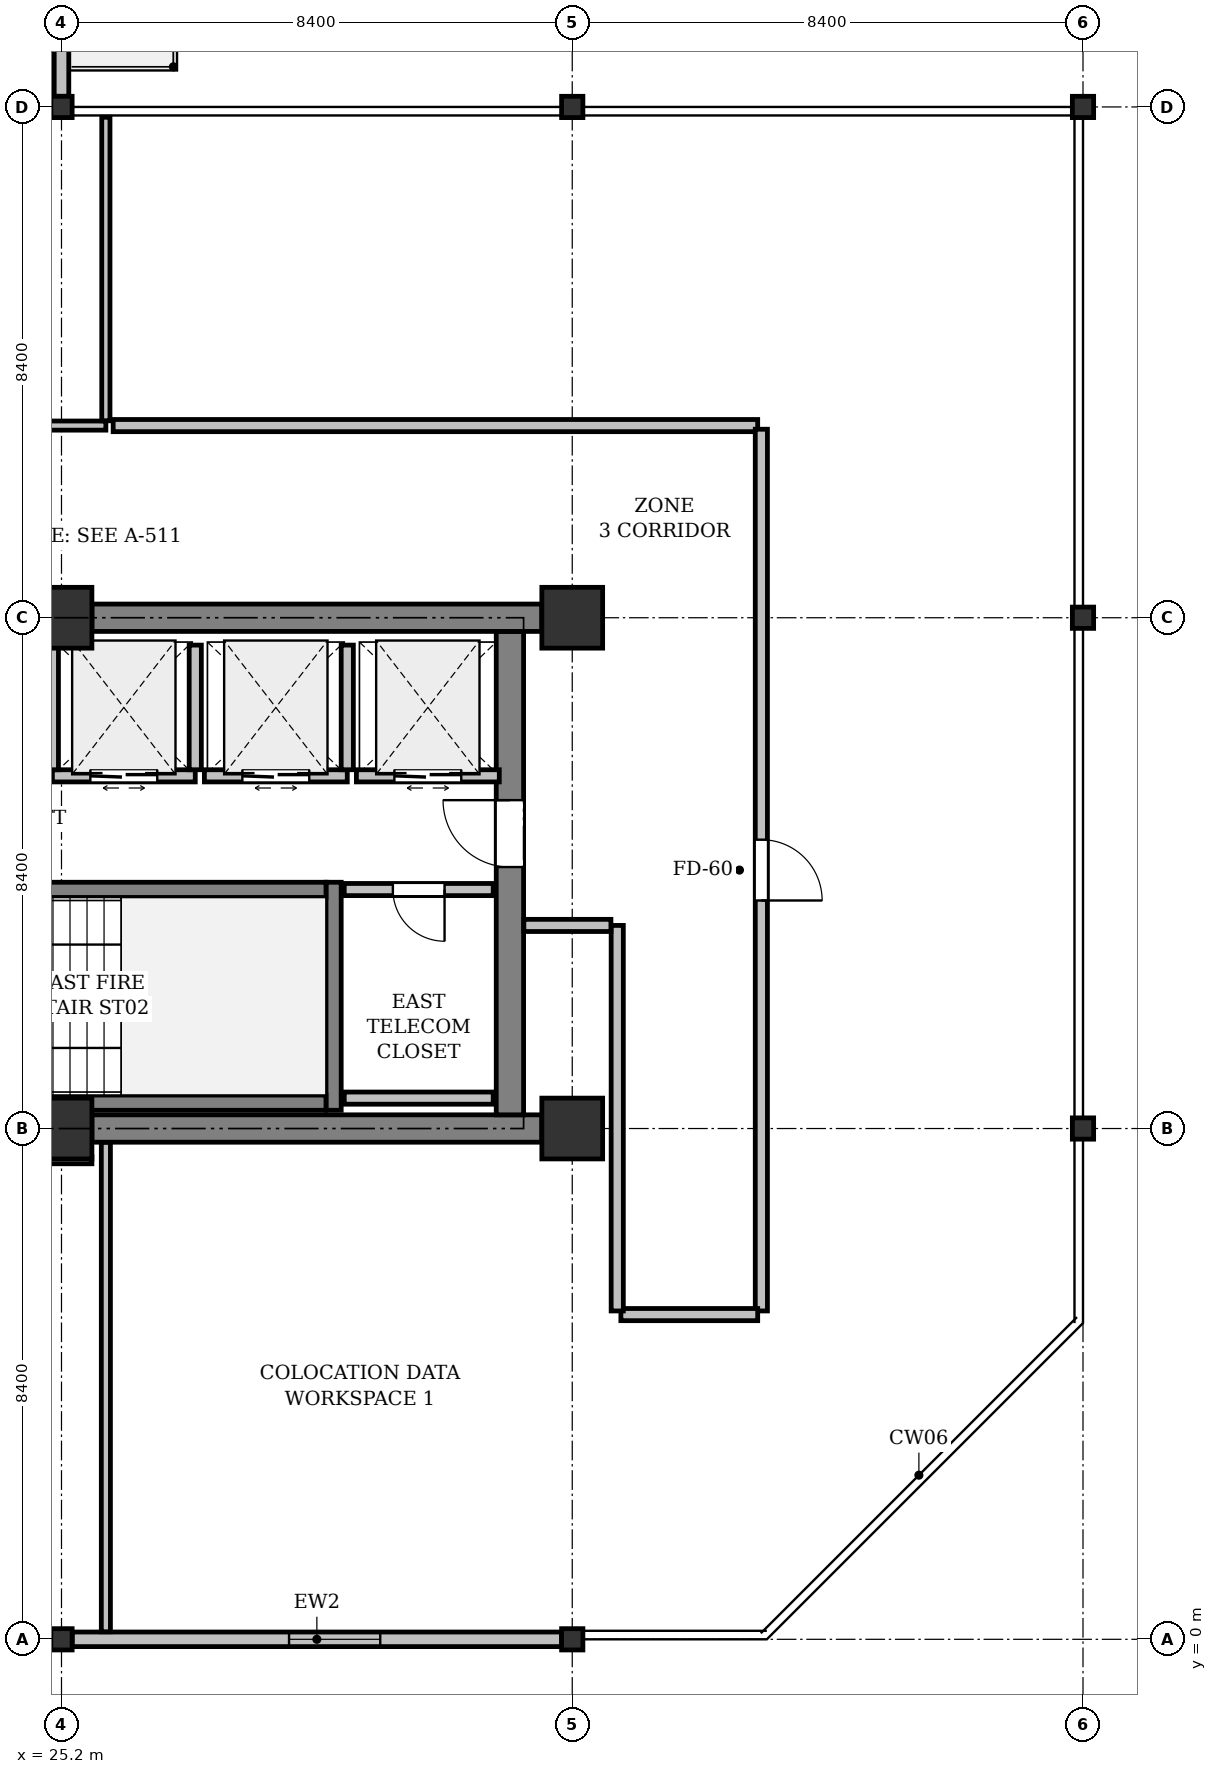
"""IFC4 building model, lengths in metres.
Left out: names, types, materials, properties, quantities, classifications, styles, units other than length and angle.
Written with IfcOpenShell. Run it as: python <this file> out.ifc"""

import sys

from ifc_helpers import new_model, si_unit, direction, frame, frame_2d, origin, origin_2d, place, context, subcontext, project, spatial, rectangle, i_section, extrude, element, fill, save


model = new_model("IFC4")
c1 = context("Model", 3, precision=1e-05, world=origin(), true_north=direction((0.0, 1.0)))
c2 = subcontext(c1, "Body", "Model", "MODEL_VIEW")
j1 = project(units=[si_unit("LENGTHUNIT", "METRE"), si_unit("PLANEANGLEUNIT", "RADIAN")], contexts=[c1])
p1 = place(None, origin())
s1 = spatial("IfcSite", under=j1, at=p1, CompositionType="ELEMENT")
p2 = place(p1, origin())
s2 = spatial("IfcBuilding", under=s1, at=p2, CompositionType="ELEMENT")
p3 = place(p2, frame((0.0, 0.0, 237.0)))
s3 = spatial("IfcBuildingStorey", under=s2, at=p3, CompositionType="ELEMENT", Elevation=237.0)
p4 = place(p3, frame((25.2, 0.0, 0.0), z_axis=(0.0, 0.0, 1.0), x_axis=(1.0, 0.0, 0.0)))
e1 = element("IfcColumn", 1, at=p4, inside=s3, PredefinedType="COLUMN", context=c2, shape_type="SweptSolid", body=[
    extrude(i_section(OverallWidth=0.35, OverallDepth=0.35, WebThickness=0.02, FlangeThickness=0.032, at=origin_2d()), origin(), (0.0, 0.0, 1.0), 4.1),
])
for number, where, z_axis, x_axis in (
    (2, (25.2, 8.4, 0.0), (0.0, 0.0, 1.0), (1.0, 0.0, 0.0)),
    (3, (25.2, 16.8, 0.0), (0.0, 0.0, 1.0), (1.0, 0.0, 0.0)),
):
    element("IfcColumn", number, at=place(p3, frame(where, z_axis=z_axis, x_axis=x_axis)), inside=s3, PredefinedType="COLUMN", context=c2, shape_type="SweptSolid", body=[
        extrude(rectangle(XDim=1.0, YDim=1.0, at=origin_2d()), origin(), (0.0, 0.0, 1.0), 4.1),
    ])
for number, where, z_axis, x_axis in (
    (4, (25.2, 25.2, 0.0), (0.0, 0.0, 1.0), (1.0, 0.0, 0.0)),
    (5, (33.6, 0.0, 0.0), (0.0, 0.0, 1.0), (1.0, 0.0, 0.0)),
):
    element("IfcColumn", number, at=place(p3, frame(where, z_axis=z_axis, x_axis=x_axis)), inside=s3, PredefinedType="COLUMN", context=c2, shape_type="SweptSolid", body=[
        extrude(i_section(OverallWidth=0.35, OverallDepth=0.35, WebThickness=0.02, FlangeThickness=0.032, at=origin_2d()), origin(), (0.0, 0.0, 1.0), 4.1),
    ])
for number, where, z_axis, x_axis in (
    (6, (33.6, 8.4, 0.0), (0.0, 0.0, 1.0), (1.0, 0.0, 0.0)),
    (7, (33.6, 16.8, 0.0), (0.0, 0.0, 1.0), (1.0, 0.0, 0.0)),
):
    element("IfcColumn", number, at=place(p3, frame(where, z_axis=z_axis, x_axis=x_axis)), inside=s3, PredefinedType="COLUMN", context=c2, shape_type="SweptSolid", body=[
        extrude(rectangle(XDim=1.0, YDim=1.0, at=origin_2d()), origin(), (0.0, 0.0, 1.0), 4.1),
    ])
for number, where, z_axis, x_axis in (
    (8, (33.6, 25.2, 0.0), (0.0, 0.0, 1.0), (1.0, 0.0, 0.0)),
    (9, (42.0, 8.4, 0.0), (0.0, 0.0, 1.0), (1.0, 0.0, 0.0)),
    (10, (42.0, 16.8, 0.0), (0.0, 0.0, 1.0), (1.0, 0.0, 0.0)),
    (11, (42.0, 25.2, 0.0), (0.0, 0.0, 1.0), (1.0, 0.0, 0.0)),
):
    element("IfcColumn", number, at=place(p3, frame(where, z_axis=z_axis, x_axis=x_axis)), inside=s3, PredefinedType="COLUMN", context=c2, shape_type="SweptSolid", body=[
        extrude(i_section(OverallWidth=0.35, OverallDepth=0.35, WebThickness=0.02, FlangeThickness=0.032, at=origin_2d()), origin(), (0.0, 0.0, 1.0), 4.1),
    ])
p5 = place(p3, frame((33.425, 0.0, 0.0), z_axis=(0.0, 0.0, 1.0), x_axis=(-1.0, 0.0, 0.0)))
e12 = element("IfcWall", 12, at=p5, inside=s3, PredefinedType="STANDARD", context=c2, shape_type="SweptSolid", body=[
    extrude(rectangle(XDim=8.05, YDim=0.24, at=frame_2d((4.025, 0.0))), origin(), (0.0, 0.0, 1.0), 3.525),
])
p6 = place(p5, frame((2.983, 0.0, 0.9)))
e13 = element("IfcOpeningElement", 13, at=p6, cuts=e12, PredefinedType="OPENING", context=c2, shape_type="SweptSolid", body=[
    extrude(rectangle(XDim=1.5, YDim=1.6, at=frame_2d((0.75, 0.8))), frame((0.0, 0.13, 0.0), z_axis=(0.0, -1.0, 0.0), x_axis=(1.0, 0.0, 0.0)), (0.0, 0.0, 1.0), 0.26),
])
p7 = place(p3, frame((25.2, 33.425, 0.0), z_axis=(0.0, 0.0, 1.0), x_axis=(0.0, -1.0, 0.0)))
e14 = element("IfcWall", 14, at=p7, inside=s3, PredefinedType="STANDARD", context=c2, shape_type="SweptSolid", body=[
    extrude(rectangle(XDim=8.05, YDim=0.24, at=frame_2d((4.025, 0.0))), origin(), (0.0, 0.0, 1.0), 3.525),
])
p8 = place(p7, frame((0.3, 0.0, 0.0)))
e15 = element("IfcOpeningElement", 15, at=p8, cuts=e14, PredefinedType="OPENING", context=c2, shape_type="SweptSolid", body=[
    extrude(rectangle(XDim=1.2, YDim=2.2, at=frame_2d((0.6, 1.1))), frame((0.0, 0.13, 0.0), z_axis=(0.0, -1.0, 0.0), x_axis=(1.0, 0.0, 0.0)), (0.0, 0.0, 1.0), 0.26),
])
p9 = place(p7, frame((2.154, 0.0, 0.9)))
e16 = element("IfcOpeningElement", 16, at=p9, cuts=e14, PredefinedType="OPENING", context=c2, shape_type="SweptSolid", body=[
    extrude(rectangle(XDim=1.5, YDim=1.6, at=frame_2d((0.75, 0.8))), frame((0.0, 0.13, 0.0), z_axis=(0.0, -1.0, 0.0), x_axis=(1.0, 0.0, 0.0)), (0.0, 0.0, 1.0), 0.26),
])
p10 = place(p3, frame((25.7, 8.4, 0.0), z_axis=(0.0, 0.0, 1.0), x_axis=(1.0, 0.0, 0.0)))
e17 = element("IfcWall", 17, at=p10, inside=s3, PredefinedType="SHEAR", context=c2, shape_type="SweptSolid", body=[
    extrude(rectangle(XDim=7.4, YDim=0.45, at=frame_2d((3.7, 0.0))), origin(), (0.0, 0.0, 1.0), 3.825),
])
p11 = place(p3, frame((32.575, 8.625, 0.0), z_axis=(0.0, 0.0, 1.0), x_axis=(0.0, 1.0, 0.0)))
e18 = element("IfcWall", 18, at=p11, inside=s3, PredefinedType="SHEAR", context=c2, shape_type="SweptSolid", body=[
    extrude(rectangle(XDim=7.95, YDim=0.45, at=frame_2d((3.975, 0.0))), origin(), (0.0, 0.0, 1.0), 3.825),
])
p12 = place(p11, frame((4.075, 0.0, 0.0)))
e19 = element("IfcOpeningElement", 19, at=p12, cuts=e18, PredefinedType="OPENING", context=c2, shape_type="SweptSolid", body=[
    extrude(rectangle(XDim=1.1, YDim=2.15, at=frame_2d((0.55, 1.075))), frame((0.0, 0.235, 0.0), z_axis=(0.0, -1.0, 0.0), x_axis=(1.0, 0.0, 0.0)), (0.0, 0.0, 1.0), 0.47),
])
p13 = place(p3, frame((25.7, 16.8, 0.0), z_axis=(0.0, 0.0, 1.0), x_axis=(1.0, 0.0, 0.0)))
e20 = element("IfcWall", 20, at=p13, inside=s3, PredefinedType="SHEAR", context=c2, shape_type="SweptSolid", body=[
    extrude(rectangle(XDim=7.4, YDim=0.45, at=frame_2d((3.7, 0.0))), origin(), (0.0, 0.0, 1.0), 3.825),
])
p14 = place(p3, frame((29.675, 8.7, 0.0), z_axis=(0.0, 0.0, 1.0), x_axis=(0.0, 1.0, 0.0)))
e21 = element("IfcWall", 21, at=p14, inside=s3, PredefinedType="SHEAR", context=c2, shape_type="SweptSolid", body=[
    extrude(rectangle(XDim=3.75, YDim=0.25, at=frame_2d((1.875, 0.0))), origin(), (0.0, 0.0, 1.0), 3.825),
])
p15 = place(p3, frame((21.8, 8.825, 0.0), z_axis=(0.0, 0.0, 1.0), x_axis=(1.0, 0.0, 0.0)))
e22 = element("IfcWall", 22, at=p15, inside=s3, PredefinedType="SHEAR", context=c2, shape_type="SweptSolid", body=[
    extrude(rectangle(XDim=7.75, YDim=0.25, at=frame_2d((3.875, 0.0))), origin(), (0.0, 0.0, 1.0), 3.825),
])
p16 = place(p3, frame((21.8, 12.325, 0.0), z_axis=(0.0, 0.0, 1.0), x_axis=(1.0, 0.0, 0.0)))
e23 = element("IfcWall", 23, at=p16, inside=s3, PredefinedType="SHEAR", context=c2, shape_type="SweptSolid", body=[
    extrude(rectangle(XDim=7.75, YDim=0.25, at=frame_2d((3.875, 0.0))), origin(), (0.0, 0.0, 1.0), 3.825),
])
p17 = place(p16, frame((0.22, 0.0, 0.0)))
e24 = element("IfcOpeningElement", 24, at=p17, cuts=e23, PredefinedType="OPENING", context=c2, shape_type="SweptSolid", body=[
    extrude(rectangle(XDim=1.1, YDim=2.15, at=frame_2d((0.55, 1.075))), frame((0.0, 0.135, 0.0), z_axis=(0.0, -1.0, 0.0), x_axis=(1.0, 0.0, 0.0)), (0.0, 0.0, 1.0), 0.27),
])
p18 = place(p3, frame((25.05, 14.2, 0.0), z_axis=(0.0, 0.0, 1.0), x_axis=(1.0, 0.0, 0.0)))
e25 = element("IfcWall", 25, at=p18, inside=s3, PredefinedType="PARTITIONING", context=c2, shape_type="SweptSolid", body=[
    extrude(rectangle(XDim=2.35, YDim=0.2, at=frame_2d((1.175, 0.0))), origin(), (0.0, 0.0, 1.0), 3.825),
])
p19 = place(p18, frame((0.625, 0.0, 0.0)))
e26 = element("IfcOpeningElement", 26, at=p19, cuts=e25, PredefinedType="OPENING", context=c2, shape_type="SweptSolid", body=[
    extrude(rectangle(XDim=1.1, YDim=2.2, at=frame_2d((0.55, 1.1))), frame((0.0, 0.11, 0.0), z_axis=(0.0, -1.0, 0.0), x_axis=(1.0, 0.0, 0.0)), (0.0, 0.0, 1.0), 0.22),
])
for number, where, z_axis, x_axis in (
    (27, (27.4, 14.3, 0.0), (0.0, 0.0, 1.0), (0.0, 1.0, 0.0)),
    (28, (25.05, 14.3, 0.0), (0.0, 0.0, 1.0), (0.0, 1.0, 0.0)),
):
    element("IfcWall", number, at=place(p3, frame(where, z_axis=z_axis, x_axis=x_axis)), inside=s3, PredefinedType="PARTITIONING", context=c2, shape_type="SweptSolid", body=[
        extrude(rectangle(XDim=2.05, YDim=0.2, at=frame_2d((1.025, 0.0))), origin(), (0.0, 0.0, 1.0), 3.825),
    ])
p20 = place(p3, frame((27.55, 14.2, 0.0), z_axis=(0.0, 0.0, 1.0), x_axis=(1.0, 0.0, 0.0)))
e29 = element("IfcWall", 29, at=p20, inside=s3, PredefinedType="PARTITIONING", context=c2, shape_type="SweptSolid", body=[
    extrude(rectangle(XDim=2.35, YDim=0.2, at=frame_2d((1.175, 0.0))), origin(), (0.0, 0.0, 1.0), 3.825),
])
p21 = place(p20, frame((0.625, 0.0, 0.0)))
e30 = element("IfcOpeningElement", 30, at=p21, cuts=e29, PredefinedType="OPENING", context=c2, shape_type="SweptSolid", body=[
    extrude(rectangle(XDim=1.1, YDim=2.2, at=frame_2d((0.55, 1.1))), frame((0.0, 0.11, 0.0), z_axis=(0.0, -1.0, 0.0), x_axis=(1.0, 0.0, 0.0)), (0.0, 0.0, 1.0), 0.22),
])
p22 = place(p3, frame((29.9, 14.3, 0.0), z_axis=(0.0, 0.0, 1.0), x_axis=(0.0, 1.0, 0.0)))
e31 = element("IfcWall", 31, at=p22, inside=s3, PredefinedType="PARTITIONING", context=c2, shape_type="SweptSolid", body=[
    extrude(rectangle(XDim=2.05, YDim=0.2, at=frame_2d((1.025, 0.0))), origin(), (0.0, 0.0, 1.0), 3.825),
])
p23 = place(p3, frame((30.05, 14.2, 0.0), z_axis=(0.0, 0.0, 1.0), x_axis=(1.0, 0.0, 0.0)))
e32 = element("IfcWall", 32, at=p23, inside=s3, PredefinedType="PARTITIONING", context=c2, shape_type="SweptSolid", body=[
    extrude(rectangle(XDim=2.35, YDim=0.2, at=frame_2d((1.175, 0.0))), origin(), (0.0, 0.0, 1.0), 3.825),
])
p24 = place(p23, frame((0.625, 0.0, 0.0)))
e33 = element("IfcOpeningElement", 33, at=p24, cuts=e32, PredefinedType="OPENING", context=c2, shape_type="SweptSolid", body=[
    extrude(rectangle(XDim=1.1, YDim=2.2, at=frame_2d((0.55, 1.1))), frame((0.0, 0.11, 0.0), z_axis=(0.0, -1.0, 0.0), x_axis=(1.0, 0.0, 0.0)), (0.0, 0.0, 1.0), 0.22),
])
p25 = place(p3, frame((32.3, 12.33, 0.0), z_axis=(0.0, 0.0, 1.0), x_axis=(-1.0, 0.0, 0.0)))
e34 = element("IfcWall", 34, at=p25, inside=s3, PredefinedType="PARTITIONING", context=c2, shape_type="SweptSolid", body=[
    extrude(rectangle(XDim=2.45, YDim=0.2, at=frame_2d((1.225, 0.0))), origin(), (0.0, 0.0, 1.0), 3.825),
])
p26 = place(p25, frame((0.8, 0.0, 0.0)))
e35 = element("IfcOpeningElement", 35, at=p26, cuts=e34, PredefinedType="OPENING", context=c2, shape_type="SweptSolid", body=[
    extrude(rectangle(XDim=0.85, YDim=2.15, at=frame_2d((0.425, 1.075))), frame((0.0, 0.11, 0.0), z_axis=(0.0, -1.0, 0.0), x_axis=(1.0, 0.0, 0.0)), (0.0, 0.0, 1.0), 0.22),
])
p27 = place(p3, frame((29.85, 8.9, 0.0), z_axis=(0.0, 0.0, 1.0), x_axis=(1.0, 0.0, 0.0)))
e36 = element("IfcWall", 36, at=p27, inside=s3, PredefinedType="PARTITIONING", context=c2, shape_type="SweptSolid", body=[
    extrude(rectangle(XDim=2.45, YDim=0.2, at=frame_2d((1.225, 0.0))), origin(), (0.0, 0.0, 1.0), 3.825),
])
p28 = place(p3, frame((7.774, 19.96, 0.0), z_axis=(0.0, 0.0, 1.0), x_axis=(1.0, 0.0, 0.0)))
e37 = element("IfcWall", 37, at=p28, inside=s3, PredefinedType="PARTITIONING", context=c2, shape_type="SweptSolid", body=[
    extrude(rectangle(XDim=18.156, YDim=0.15, at=frame_2d((9.078, 0.0))), origin(), (0.0, 0.0, 1.0), 3.371),
])
p29 = place(p28, frame((8.603, 0.0, 0.0)))
e38 = element("IfcOpeningElement", 38, at=p29, cuts=e37, PredefinedType="OPENING", context=c2, shape_type="SweptSolid", body=[
    extrude(rectangle(XDim=0.95, YDim=2.15, at=frame_2d((0.475, 1.075))), frame((0.0, 0.085, 0.0), z_axis=(0.0, -1.0, 0.0), x_axis=(1.0, 0.0, 0.0)), (0.0, 0.0, 1.0), 0.17),
])
p30 = place(p3, frame((25.93, 20.039, 0.0), z_axis=(0.0, 0.0, 1.0), x_axis=(0.0, 1.0, 0.0)))
e39 = element("IfcWall", 39, at=p30, inside=s3, PredefinedType="PARTITIONING", context=c2, shape_type="SweptSolid", body=[
    extrude(rectangle(XDim=4.992, YDim=0.135, at=frame_2d((2.496, 0.0))), origin(), (0.0, 0.0, 1.0), 3.825),
])
p31 = place(p3, frame((25.93, 0.124, 0.0), z_axis=(0.0, 0.0, 1.0), x_axis=(0.0, 1.0, 0.0)))
e40 = element("IfcWall", 40, at=p31, inside=s3, PredefinedType="PARTITIONING", context=c2, shape_type="SweptSolid", body=[
    extrude(rectangle(XDim=8.047, YDim=0.15, at=frame_2d((4.023, 0.0))), origin(), (0.0, 0.0, 1.0), 3.825),
])
p32 = place(p3, frame((25.7, 7.88, 0.0), z_axis=(0.0, 0.0, 1.0), x_axis=(-0.999999528702, 0.000970873329, 0.0)))
e41 = element("IfcWall", 41, at=p32, inside=s3, PredefinedType="PARTITIONING", context=c2, shape_type="SweptSolid", body=[
    extrude(rectangle(XDim=1.006, YDim=0.12, at=frame_2d((0.503, 0.0))), origin(), (0.0, 0.0, 1.0), 3.371),
])
p33 = place(p3, frame((26.05, 19.96, 0.0), z_axis=(0.0, 0.0, 1.0), x_axis=(1.0, 0.0, 0.0)))
e42 = element("IfcWall", 42, at=p33, inside=s3, PredefinedType="PARTITIONING", context=c2, shape_type="SweptSolid", body=[
    extrude(rectangle(XDim=10.6, YDim=0.2, at=frame_2d((5.3, 0.0))), origin(), (0.0, 0.0, 1.0), 3.371),
])
p34 = place(p3, frame((36.71, 19.9, 0.0), z_axis=(0.0, 0.0, 1.0), x_axis=(0.0, -1.0, 0.0)))
e43 = element("IfcWall", 43, at=p34, inside=s3, PredefinedType="PARTITIONING", context=c2, shape_type="SweptSolid", body=[
    extrude(rectangle(XDim=14.5, YDim=0.2, at=frame_2d((7.25, 0.0))), origin(), (0.0, 0.0, 1.0), 3.365),
])
p35 = place(p34, frame((6.75, 0.0, 0.0)))
e44 = element("IfcOpeningElement", 44, at=p35, cuts=e43, PredefinedType="OPENING", context=c2, shape_type="SweptSolid", body=[
    extrude(rectangle(XDim=1.0, YDim=2.15, at=frame_2d((0.5, 1.075))), frame((0.0, 0.11, 0.0), z_axis=(0.0, -1.0, 0.0), x_axis=(1.0, 0.0, 0.0)), (0.0, 0.0, 1.0), 0.22),
])
p36 = place(p3, frame((36.65, 5.34, 0.0), z_axis=(0.0, 0.0, 1.0), x_axis=(-1.0, 0.0, 0.0)))
e45 = element("IfcWall", 45, at=p36, inside=s3, PredefinedType="PARTITIONING", context=c2, shape_type="SweptSolid", body=[
    extrude(rectangle(XDim=2.25, YDim=0.2, at=frame_2d((1.125, 0.0))), origin(), (0.0, 0.0, 1.0), 3.825),
])
p37 = place(p3, frame((34.34, 5.4, 0.0), z_axis=(0.0, 0.0, 1.0), x_axis=(0.0, 1.0, 0.0)))
e46 = element("IfcWall", 46, at=p37, inside=s3, PredefinedType="PARTITIONING", context=c2, shape_type="SweptSolid", body=[
    extrude(rectangle(XDim=6.34, YDim=0.2, at=frame_2d((3.17, 0.0))), origin(), (0.0, 0.0, 1.0), 3.365),
])
p38 = place(p3, frame((34.236, 11.74, 0.0), z_axis=(0.0, 0.0, 1.0), x_axis=(-1.0, 0.0, 0.0)))
e47 = element("IfcWall", 47, at=p38, inside=s3, PredefinedType="PARTITIONING", context=c2, shape_type="SweptSolid", body=[
    extrude(rectangle(XDim=1.432, YDim=0.2, at=frame_2d((0.716, 0.0))), origin(), (0.0, 0.0, 1.0), 3.371),
])
p39 = place(p6, origin())
e48 = element("IfcWindow", 48, at=p39, inside=s3, PartitioningType="SINGLE_PANEL", PredefinedType="WINDOW", context=c2, shape_type="SweptSolid", body=[
    extrude(rectangle(XDim=1.5, YDim=1.6, at=frame_2d((0.75, 0.8))), frame((0.0, 0.03, 0.0), z_axis=(0.0, -1.0, 0.0), x_axis=(1.0, 0.0, 0.0)), (0.0, 0.0, 1.0), 0.06),
])
fill(e13, e48)
p40 = place(p12, origin())
e49 = element("IfcDoor", 49, at=p40, inside=s3, OperationType="SINGLE_SWING_RIGHT", PredefinedType="DOOR", context=c2, shape_type="SweptSolid", body=[
    extrude(rectangle(XDim=1.1, YDim=2.15, at=frame_2d((0.55, 1.075))), frame((0.0, 0.025, 0.0), z_axis=(0.0, -1.0, 0.0), x_axis=(1.0, 0.0, 0.0)), (0.0, 0.0, 1.0), 0.05),
])
fill(e19, e49)
p41 = place(p19, origin())
e50 = element("IfcDoor", 50, at=p41, inside=s3, OperationType="DOUBLE_DOOR_SLIDING", PredefinedType="DOOR", context=c2, shape_type="SweptSolid", body=[
    extrude(rectangle(XDim=1.1, YDim=2.2, at=frame_2d((0.55, 1.1))), frame((0.0, 0.025, 0.0), z_axis=(0.0, -1.0, 0.0), x_axis=(1.0, 0.0, 0.0)), (0.0, 0.0, 1.0), 0.05),
])
fill(e26, e50)
p42 = place(p21, origin())
e51 = element("IfcDoor", 51, at=p42, inside=s3, OperationType="DOUBLE_DOOR_SLIDING", PredefinedType="DOOR", context=c2, shape_type="SweptSolid", body=[
    extrude(rectangle(XDim=1.1, YDim=2.2, at=frame_2d((0.55, 1.1))), frame((0.0, 0.025, 0.0), z_axis=(0.0, -1.0, 0.0), x_axis=(1.0, 0.0, 0.0)), (0.0, 0.0, 1.0), 0.05),
])
fill(e30, e51)
p43 = place(p24, origin())
e52 = element("IfcDoor", 52, at=p43, inside=s3, OperationType="DOUBLE_DOOR_SLIDING", PredefinedType="DOOR", context=c2, shape_type="SweptSolid", body=[
    extrude(rectangle(XDim=1.1, YDim=2.2, at=frame_2d((0.55, 1.1))), frame((0.0, 0.025, 0.0), z_axis=(0.0, -1.0, 0.0), x_axis=(1.0, 0.0, 0.0)), (0.0, 0.0, 1.0), 0.05),
])
fill(e33, e52)
p44 = place(p26, origin())
e53 = element("IfcDoor", 53, at=p44, inside=s3, OperationType="SINGLE_SWING_LEFT", PredefinedType="DOOR", context=c2, shape_type="SweptSolid", body=[
    extrude(rectangle(XDim=0.85, YDim=2.15, at=frame_2d((0.425, 1.075))), frame((0.0, 0.025, 0.0), z_axis=(0.0, -1.0, 0.0), x_axis=(1.0, 0.0, 0.0)), (0.0, 0.0, 1.0), 0.05),
])
fill(e35, e53)
p45 = place(p35, origin())
e54 = element("IfcDoor", 54, at=p45, inside=s3, OperationType="SINGLE_SWING_RIGHT", PredefinedType="DOOR", context=c2, shape_type="SweptSolid", body=[
    extrude(rectangle(XDim=1.0, YDim=2.15, at=frame_2d((0.5, 1.075))), frame((0.0, 0.025, 0.0), z_axis=(0.0, -1.0, 0.0), x_axis=(1.0, 0.0, 0.0)), (0.0, 0.0, 1.0), 0.05),
])
fill(e44, e54)
save(model, sys.argv[1])
